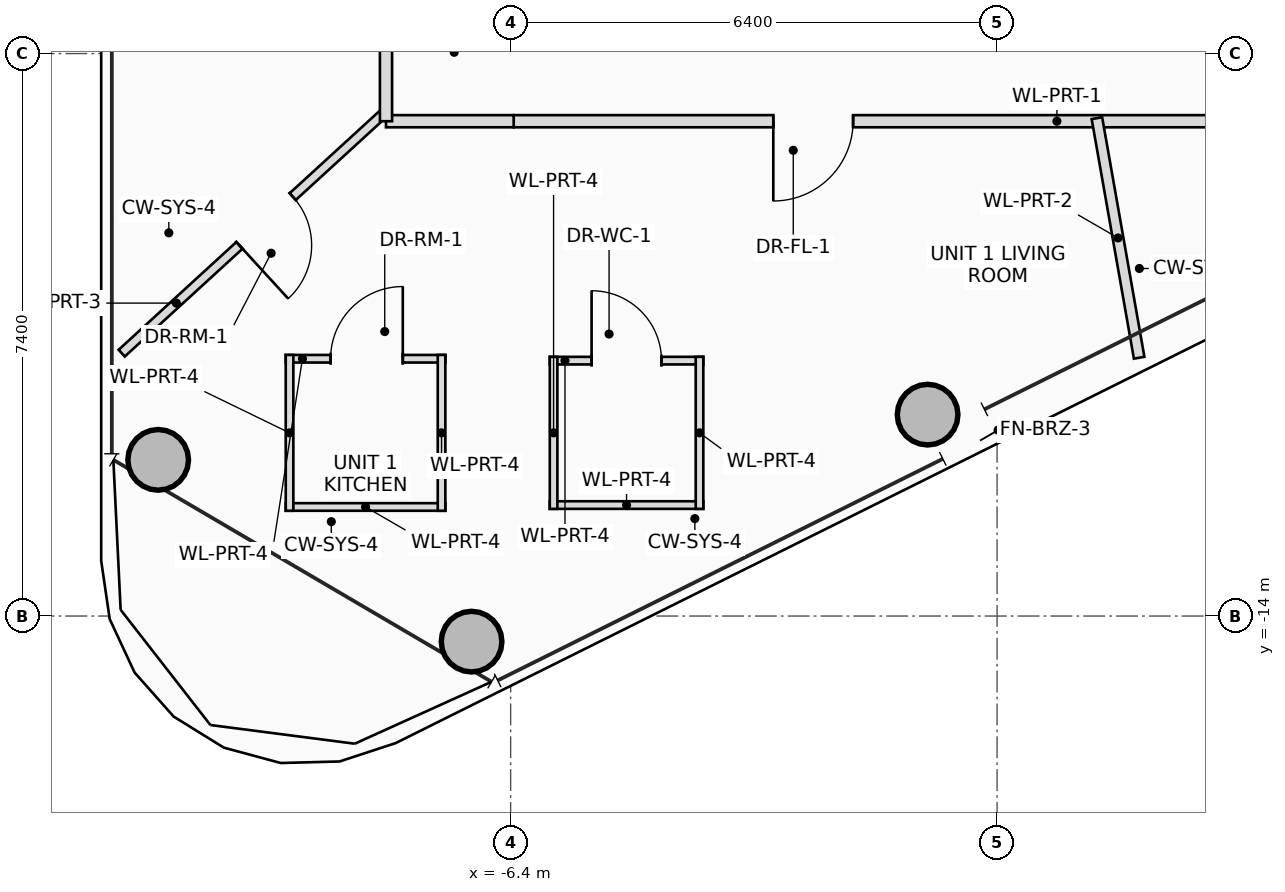
"""IFC4 building model, lengths in metres.
Left out: names, types, materials, properties, quantities, classifications, styles, units other than length and angle.
Written with IfcOpenShell. Run it as: python <this file> out.ifc"""

import sys

from ifc_helpers import new_model, si_unit, direction, frame, frame_2d, origin, origin_2d, place, context, subcontext, project, spatial, rectangle, hollow_circle, extrude, source, transform, mapped, element, fill, save


model = new_model("IFC4")
c1 = context("Model", 3, precision=1e-05, world=origin(), true_north=direction((0.0, 1.0)))
c2 = subcontext(c1, "Body", "Model", "MODEL_VIEW")
j1 = project(units=[si_unit("LENGTHUNIT", "METRE"), si_unit("PLANEANGLEUNIT", "RADIAN")], contexts=[c1])
p1 = place(None, origin())
s1 = spatial("IfcSite", under=j1, at=p1, CompositionType="ELEMENT")
p2 = place(p1, origin())
s2 = spatial("IfcBuilding", under=s1, at=p2, CompositionType="ELEMENT")
p3 = place(p2, frame((0.0, 0.0, 300.2)))
s3 = spatial("IfcBuildingStorey", under=s2, at=p3, CompositionType="ELEMENT", Elevation=300.2)
m1 = source(origin(), c2, "Body", "SweptSolid", [
    extrude(hollow_circle(Radius=0.4, WallThickness=0.028, at=origin_2d()), origin(), (0.0, 0.0, 1.0), 3.45),
])
for number, where, z_axis, x_axis in (
    (1, (-6.914, -14.337, 0.0), (0.0, 0.0, 1.0), (1.0, 0.0, 0.0)),
    (2, (-0.914, -11.35, 0.0), (0.0, 0.0, 1.0), (1.0, 0.0, 0.0)),
    (3, (-11.037, -11.945, 0.0), (0.0, 0.0, 1.0), (1.0, 0.0, 0.0)),
):
    element("IfcColumn", number, at=place(p3, frame(where, z_axis=z_axis, x_axis=x_axis)), inside=s3, PredefinedType="COLUMN", context=c2, shape_type="MappedRepresentation", body=[
        mapped(m1, transform((0.0, 0.0, 0.0), scale=1.0)),
    ])
p4 = place(p3, frame((-8.07, -7.386, 0.0), z_axis=(0.0, 0.0, 1.0), x_axis=(-0.737657036201, -0.675175604523, 0.0)))
e4 = element("IfcWall", 4, at=p4, inside=s3, PredefinedType="PARTITIONING", context=c2, shape_type="SweptSolid", body=[
    extrude(rectangle(XDim=4.673, YDim=0.12, at=frame_2d((2.337, 0.0))), origin(), (0.0, 0.0, 1.0), 2.815),
])
p5 = place(p4, frame((1.623, 0.0, 0.0)))
e5 = element("IfcOpeningElement", 5, at=p5, cuts=e4, PredefinedType="OPENING", context=c2, shape_type="SweptSolid", body=[
    extrude(rectangle(XDim=0.95, YDim=2.1, at=frame_2d((0.475, 1.05))), frame((0.0, 0.07, 0.0), z_axis=(0.0, -1.0, 0.0), x_axis=(1.0, 0.0, 0.0)), (0.0, 0.0, 1.0), 0.14),
])
p6 = place(p3, frame((-5.885, -10.64, 0.0), z_axis=(0.0, 0.0, 1.0), x_axis=(1.0, 0.0, 0.0)))
e6 = element("IfcWall", 6, at=p6, inside=s3, PredefinedType="PARTITIONING", context=c2, shape_type="SweptSolid", body=[
    extrude(rectangle(XDim=2.02, YDim=0.1, at=frame_2d((1.01, 0.0))), origin(), (0.0, 0.0, 1.0), 2.905),
])
p7 = place(p6, frame((0.55, 0.0, 0.0)))
e7 = element("IfcOpeningElement", 7, at=p7, cuts=e6, PredefinedType="OPENING", context=c2, shape_type="SweptSolid", body=[
    extrude(rectangle(XDim=0.92, YDim=2.1, at=frame_2d((0.46, 1.05))), frame((0.0, 0.06, 0.0), z_axis=(0.0, -1.0, 0.0), x_axis=(1.0, 0.0, 0.0)), (0.0, 0.0, 1.0), 0.12),
])
p8 = place(p3, frame((-3.865, -12.54, 0.0), z_axis=(0.0, 0.0, 1.0), x_axis=(-1.0, 0.0, 0.0)))
e8 = element("IfcWall", 8, at=p8, inside=s3, PredefinedType="PARTITIONING", context=c2, shape_type="SweptSolid", body=[
    extrude(rectangle(XDim=2.02, YDim=0.1, at=frame_2d((1.01, 0.0))), origin(), (0.0, 0.0, 1.0), 3.25),
])
for number, where, z_axis, x_axis in (
    (9, (-3.915, -10.59, 0.0), (0.0, 0.0, 1.0), (0.0, -1.0, 0.0)),
    (10, (-5.835, -12.59, 0.0), (0.0, 0.0, 1.0), (0.0, 1.0, 0.0)),
):
    element("IfcWall", number, at=place(p3, frame(where, z_axis=z_axis, x_axis=x_axis)), inside=s3, PredefinedType="PARTITIONING", context=c2, shape_type="SweptSolid", body=[
        extrude(rectangle(XDim=2.0, YDim=0.1, at=frame_2d((1.0, 0.0))), origin(), (0.0, 0.0, 1.0), 2.905),
    ])
p9 = place(p3, frame((-9.359, -10.615, 0.0), z_axis=(0.0, 0.0, 1.0), x_axis=(1.0, 0.0, 0.0)))
e11 = element("IfcWall", 11, at=p9, inside=s3, PredefinedType="PARTITIONING", context=c2, shape_type="SweptSolid", body=[
    extrude(rectangle(XDim=2.1, YDim=0.1, at=frame_2d((1.05, 0.0))), origin(), (0.0, 0.0, 1.0), 2.905),
])
p10 = place(p9, frame((0.59, 0.0, 0.0)))
e12 = element("IfcOpeningElement", 12, at=p10, cuts=e11, PredefinedType="OPENING", context=c2, shape_type="SweptSolid", body=[
    extrude(rectangle(XDim=0.95, YDim=2.1, at=frame_2d((0.475, 1.05))), frame((0.0, 0.06, 0.0), z_axis=(0.0, -1.0, 0.0), x_axis=(1.0, 0.0, 0.0)), (0.0, 0.0, 1.0), 0.12),
])
p11 = place(p3, frame((-7.259, -12.565, 0.0), z_axis=(0.0, 0.0, 1.0), x_axis=(-1.0, 0.0, 0.0)))
e13 = element("IfcWall", 13, at=p11, inside=s3, PredefinedType="PARTITIONING", context=c2, shape_type="SweptSolid", body=[
    extrude(rectangle(XDim=2.1, YDim=0.1, at=frame_2d((1.05, 0.0))), origin(), (0.0, 0.0, 1.0), 3.25),
])
for number, where, z_axis, x_axis in (
    (14, (-7.309, -10.565, 0.0), (0.0, 0.0, 1.0), (0.0, -1.0, 0.0)),
    (15, (-9.309, -12.615, 0.0), (0.0, 0.0, 1.0), (0.0, 1.0, 0.0)),
):
    element("IfcWall", number, at=place(p3, frame(where, z_axis=z_axis, x_axis=x_axis)), inside=s3, PredefinedType="PARTITIONING", context=c2, shape_type="SweptSolid", body=[
        extrude(rectangle(XDim=2.05, YDim=0.1, at=frame_2d((1.025, 0.0))), origin(), (0.0, 0.0, 1.0), 2.905),
    ])
p12 = place(p3, frame((3.319, -7.49, 0.0), z_axis=(0.0, 0.0, 1.0), x_axis=(-1.0, 0.0, 0.0)))
e16 = element("IfcWall", 16, at=p12, inside=s3, PredefinedType="PARTITIONING", context=c2, shape_type="SweptSolid", body=[
    extrude(rectangle(XDim=9.679, YDim=0.16, at=frame_2d((4.84, 0.0))), origin(), (0.0, 0.0, 1.0), 2.655),
])
p13 = place(p12, frame((5.213, 0.0, 0.0)))
e17 = element("IfcOpeningElement", 17, at=p13, cuts=e16, PredefinedType="OPENING", context=c2, shape_type="SweptSolid", body=[
    extrude(rectangle(XDim=1.05, YDim=2.2, at=frame_2d((0.525, 1.1))), frame((0.0, 0.09, 0.0), z_axis=(0.0, -1.0, 0.0), x_axis=(1.0, 0.0, 0.0)), (0.0, 0.0, 1.0), 0.18),
])
p14 = place(p3, frame((-6.36, -7.49, 0.0), z_axis=(0.0, 0.0, 1.0), x_axis=(-1.0, 0.0, 0.0)))
e18 = element("IfcWall", 18, at=p14, inside=s3, PredefinedType="PARTITIONING", context=c2, shape_type="SweptSolid", body=[
    extrude(rectangle(XDim=1.68, YDim=0.16, at=frame_2d((0.84, 0.0))), origin(), (0.0, 0.0, 1.0), 2.655),
])
p15 = place(p3, frame((-8.04, -7.49, 0.0), z_axis=(0.0, 0.0, 1.0), x_axis=(0.0, 1.0, 0.0)))
e19 = element("IfcWall", 19, at=p15, inside=s3, PredefinedType="PARTITIONING", context=c2, shape_type="SweptSolid", body=[
    extrude(rectangle(XDim=1.64, YDim=0.16, at=frame_2d((0.82, 0.0))), origin(), (0.0, 0.0, 1.0), 3.25),
])
p16 = place(p3, frame((1.314, -7.45, 0.0), z_axis=(0.0, 0.0, 1.0), x_axis=(0.173619966433, -0.984812726997, 0.0)))
e20 = element("IfcWall", 20, at=p16, inside=s3, PredefinedType="PARTITIONING", context=c2, shape_type="SweptSolid", body=[
    extrude(rectangle(XDim=3.2, YDim=0.14, at=frame_2d((1.6, 0.0))), origin(), (0.0, 0.0, 1.0), 2.815),
])
p17 = place(p5, origin())
e21 = element("IfcDoor", 21, at=p17, inside=s3, OperationType="SINGLE_SWING_RIGHT", PredefinedType="DOOR", context=c2, shape_type="SweptSolid", body=[
    extrude(rectangle(XDim=0.95, YDim=2.1, at=frame_2d((0.475, 1.05))), frame((0.0, 0.025, 0.0), z_axis=(0.0, -1.0, 0.0), x_axis=(1.0, 0.0, 0.0)), (0.0, 0.0, 1.0), 0.05),
])
fill(e5, e21)
p18 = place(p7, origin())
e22 = element("IfcDoor", 22, at=p18, inside=s3, OperationType="SINGLE_SWING_LEFT", PredefinedType="DOOR", context=c2, shape_type="SweptSolid", body=[
    extrude(rectangle(XDim=0.92, YDim=2.1, at=frame_2d((0.46, 1.05))), frame((0.0, 0.025, 0.0), z_axis=(0.0, -1.0, 0.0), x_axis=(1.0, 0.0, 0.0)), (0.0, 0.0, 1.0), 0.05),
])
fill(e7, e22)
p19 = place(p10, origin())
e23 = element("IfcDoor", 23, at=p19, inside=s3, OperationType="SINGLE_SWING_RIGHT", PredefinedType="DOOR", context=c2, shape_type="SweptSolid", body=[
    extrude(rectangle(XDim=0.95, YDim=2.1, at=frame_2d((0.475, 1.05))), frame((0.0, 0.025, 0.0), z_axis=(0.0, -1.0, 0.0), x_axis=(1.0, 0.0, 0.0)), (0.0, 0.0, 1.0), 0.05),
])
fill(e12, e23)
p20 = place(p13, origin())
e24 = element("IfcDoor", 24, at=p20, inside=s3, OperationType="SINGLE_SWING_RIGHT", PredefinedType="DOOR", context=c2, shape_type="SweptSolid", body=[
    extrude(rectangle(XDim=1.05, YDim=2.2, at=frame_2d((0.525, 1.1))), frame((0.0, 0.025, 0.0), z_axis=(0.0, -1.0, 0.0), x_axis=(1.0, 0.0, 0.0)), (0.0, 0.0, 1.0), 0.05),
])
fill(e17, e24)
save(model, sys.argv[1])
